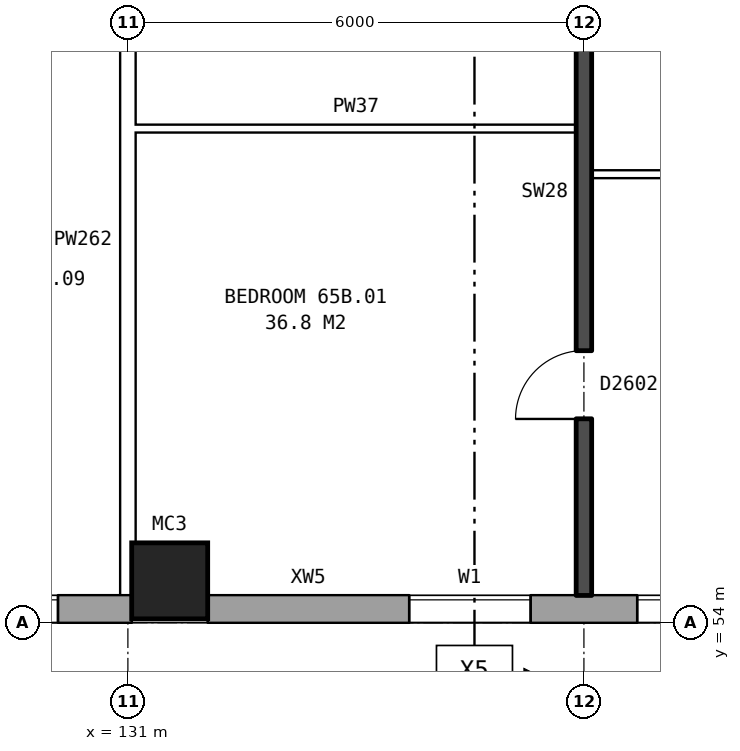
"""IFC4 building model, lengths in metres.
Left out: names, types, materials, properties, quantities, classifications, styles, units other than length and angle.
Written with IfcOpenShell. Run it as: python <this file> out.ifc"""

import sys

from ifc_helpers import new_model, si_unit, direction, frame, frame_2d, origin, origin_2d, place, context, subcontext, project, spatial, rectangle, hollow_rectangle, extrude, element, fill, save


model = new_model("IFC4")
c1 = context("Model", 3, precision=1e-05, world=origin(), true_north=direction((0.0, 1.0)))
c2 = subcontext(c1, "Body", "Model", "MODEL_VIEW")
j1 = project(units=[si_unit("LENGTHUNIT", "METRE"), si_unit("PLANEANGLEUNIT", "RADIAN")], contexts=[c1])
p1 = place(None, origin())
s1 = spatial("IfcSite", under=j1, at=p1, CompositionType="ELEMENT")
p2 = place(p1, origin())
s2 = spatial("IfcBuilding", under=s1, at=p2, CompositionType="ELEMENT")
p3 = place(p2, frame((0.0, 0.0, 230.7)))
s3 = spatial("IfcBuildingStorey", under=s2, at=p3, CompositionType="ELEMENT", Elevation=230.7)
p4 = place(p3, frame((131.55, 54.55, 0.0), z_axis=(0.0, 0.0, 1.0), x_axis=(1.0, 0.0, 0.0)))
e1 = element("IfcColumn", 1, at=p4, inside=s3, PredefinedType="COLUMN", context=c2, shape_type="SweptSolid", body=[
    extrude(hollow_rectangle(XDim=1.0, YDim=1.0, WallThickness=0.055, at=origin_2d()), origin(), (0.0, 0.0, 1.0), 3.1),
])
p5 = place(p3, frame((75.95, 54.18, 0.0), z_axis=(0.0, 0.0, 1.0), x_axis=(1.0, 0.0, 0.0)))
e2 = element("IfcWall", 2, at=p5, inside=s3, PredefinedType="STANDARD", context=c2, shape_type="SweptSolid", body=[
    extrude(rectangle(XDim=55.1, YDim=0.36, at=frame_2d((27.55, 0.0))), origin(), (0.0, 0.0, 1.0), 2.85),
])
p6 = place(p5, frame((0.969, 0.0, 0.8)))
e3 = element("IfcOpeningElement", 3, at=p6, cuts=e2, PredefinedType="OPENING", context=c2, shape_type="SweptSolid", body=[
    extrude(rectangle(XDim=1.6, YDim=1.8, at=frame_2d((0.8, 0.9))), frame((0.0, 0.19, 0.0), z_axis=(0.0, -1.0, 0.0), x_axis=(1.0, 0.0, 0.0)), (0.0, 0.0, 1.0), 0.38),
])
p7 = place(p5, frame((4.406, 0.0, 0.8)))
e4 = element("IfcOpeningElement", 4, at=p7, cuts=e2, PredefinedType="OPENING", context=c2, shape_type="SweptSolid", body=[
    extrude(rectangle(XDim=1.6, YDim=1.8, at=frame_2d((0.8, 0.9))), frame((0.0, 0.19, 0.0), z_axis=(0.0, -1.0, 0.0), x_axis=(1.0, 0.0, 0.0)), (0.0, 0.0, 1.0), 0.38),
])
p8 = place(p5, frame((7.844, 0.0, 0.8)))
e5 = element("IfcOpeningElement", 5, at=p8, cuts=e2, PredefinedType="OPENING", context=c2, shape_type="SweptSolid", body=[
    extrude(rectangle(XDim=1.6, YDim=1.8, at=frame_2d((0.8, 0.9))), frame((0.0, 0.19, 0.0), z_axis=(0.0, -1.0, 0.0), x_axis=(1.0, 0.0, 0.0)), (0.0, 0.0, 1.0), 0.38),
])
p9 = place(p5, frame((11.281, 0.0, 0.8)))
e6 = element("IfcOpeningElement", 6, at=p9, cuts=e2, PredefinedType="OPENING", context=c2, shape_type="SweptSolid", body=[
    extrude(rectangle(XDim=1.6, YDim=1.8, at=frame_2d((0.8, 0.9))), frame((0.0, 0.19, 0.0), z_axis=(0.0, -1.0, 0.0), x_axis=(1.0, 0.0, 0.0)), (0.0, 0.0, 1.0), 0.38),
])
p10 = place(p5, frame((14.719, 0.0, 0.8)))
e7 = element("IfcOpeningElement", 7, at=p10, cuts=e2, PredefinedType="OPENING", context=c2, shape_type="SweptSolid", body=[
    extrude(rectangle(XDim=1.6, YDim=1.8, at=frame_2d((0.8, 0.9))), frame((0.0, 0.19, 0.0), z_axis=(0.0, -1.0, 0.0), x_axis=(1.0, 0.0, 0.0)), (0.0, 0.0, 1.0), 0.38),
])
p11 = place(p5, frame((18.156, 0.0, 0.8)))
e8 = element("IfcOpeningElement", 8, at=p11, cuts=e2, PredefinedType="OPENING", context=c2, shape_type="SweptSolid", body=[
    extrude(rectangle(XDim=1.6, YDim=1.8, at=frame_2d((0.8, 0.9))), frame((0.0, 0.19, 0.0), z_axis=(0.0, -1.0, 0.0), x_axis=(1.0, 0.0, 0.0)), (0.0, 0.0, 1.0), 0.38),
])
p12 = place(p5, frame((21.594, 0.0, 0.8)))
e9 = element("IfcOpeningElement", 9, at=p12, cuts=e2, PredefinedType="OPENING", context=c2, shape_type="SweptSolid", body=[
    extrude(rectangle(XDim=1.6, YDim=1.8, at=frame_2d((0.8, 0.9))), frame((0.0, 0.19, 0.0), z_axis=(0.0, -1.0, 0.0), x_axis=(1.0, 0.0, 0.0)), (0.0, 0.0, 1.0), 0.38),
])
p13 = place(p5, frame((25.031, 0.0, 0.8)))
e10 = element("IfcOpeningElement", 10, at=p13, cuts=e2, PredefinedType="OPENING", context=c2, shape_type="SweptSolid", body=[
    extrude(rectangle(XDim=1.6, YDim=1.8, at=frame_2d((0.8, 0.9))), frame((0.0, 0.19, 0.0), z_axis=(0.0, -1.0, 0.0), x_axis=(1.0, 0.0, 0.0)), (0.0, 0.0, 1.0), 0.38),
])
p14 = place(p5, frame((28.469, 0.0, 0.8)))
e11 = element("IfcOpeningElement", 11, at=p14, cuts=e2, PredefinedType="OPENING", context=c2, shape_type="SweptSolid", body=[
    extrude(rectangle(XDim=1.6, YDim=1.8, at=frame_2d((0.8, 0.9))), frame((0.0, 0.19, 0.0), z_axis=(0.0, -1.0, 0.0), x_axis=(1.0, 0.0, 0.0)), (0.0, 0.0, 1.0), 0.38),
])
p15 = place(p5, frame((31.906, 0.0, 0.8)))
e12 = element("IfcOpeningElement", 12, at=p15, cuts=e2, PredefinedType="OPENING", context=c2, shape_type="SweptSolid", body=[
    extrude(rectangle(XDim=1.6, YDim=1.8, at=frame_2d((0.8, 0.9))), frame((0.0, 0.19, 0.0), z_axis=(0.0, -1.0, 0.0), x_axis=(1.0, 0.0, 0.0)), (0.0, 0.0, 1.0), 0.38),
])
p16 = place(p5, frame((35.344, 0.0, 0.8)))
e13 = element("IfcOpeningElement", 13, at=p16, cuts=e2, PredefinedType="OPENING", context=c2, shape_type="SweptSolid", body=[
    extrude(rectangle(XDim=1.6, YDim=1.8, at=frame_2d((0.8, 0.9))), frame((0.0, 0.19, 0.0), z_axis=(0.0, -1.0, 0.0), x_axis=(1.0, 0.0, 0.0)), (0.0, 0.0, 1.0), 0.38),
])
p17 = place(p5, frame((38.781, 0.0, 0.8)))
e14 = element("IfcOpeningElement", 14, at=p17, cuts=e2, PredefinedType="OPENING", context=c2, shape_type="SweptSolid", body=[
    extrude(rectangle(XDim=1.6, YDim=1.8, at=frame_2d((0.8, 0.9))), frame((0.0, 0.19, 0.0), z_axis=(0.0, -1.0, 0.0), x_axis=(1.0, 0.0, 0.0)), (0.0, 0.0, 1.0), 0.38),
])
p18 = place(p5, frame((42.219, 0.0, 0.8)))
e15 = element("IfcOpeningElement", 15, at=p18, cuts=e2, PredefinedType="OPENING", context=c2, shape_type="SweptSolid", body=[
    extrude(rectangle(XDim=1.6, YDim=1.8, at=frame_2d((0.8, 0.9))), frame((0.0, 0.19, 0.0), z_axis=(0.0, -1.0, 0.0), x_axis=(1.0, 0.0, 0.0)), (0.0, 0.0, 1.0), 0.38),
])
p19 = place(p5, frame((45.656, 0.0, 0.8)))
e16 = element("IfcOpeningElement", 16, at=p19, cuts=e2, PredefinedType="OPENING", context=c2, shape_type="SweptSolid", body=[
    extrude(rectangle(XDim=1.6, YDim=1.8, at=frame_2d((0.8, 0.9))), frame((0.0, 0.19, 0.0), z_axis=(0.0, -1.0, 0.0), x_axis=(1.0, 0.0, 0.0)), (0.0, 0.0, 1.0), 0.38),
])
p20 = place(p5, frame((49.094, 0.0, 0.8)))
e17 = element("IfcOpeningElement", 17, at=p20, cuts=e2, PredefinedType="OPENING", context=c2, shape_type="SweptSolid", body=[
    extrude(rectangle(XDim=1.6, YDim=1.8, at=frame_2d((0.8, 0.9))), frame((0.0, 0.19, 0.0), z_axis=(0.0, -1.0, 0.0), x_axis=(1.0, 0.0, 0.0)), (0.0, 0.0, 1.0), 0.38),
])
p21 = place(p5, frame((52.531, 0.0, 0.8)))
e18 = element("IfcOpeningElement", 18, at=p21, cuts=e2, PredefinedType="OPENING", context=c2, shape_type="SweptSolid", body=[
    extrude(rectangle(XDim=1.6, YDim=1.8, at=frame_2d((0.8, 0.9))), frame((0.0, 0.19, 0.0), z_axis=(0.0, -1.0, 0.0), x_axis=(1.0, 0.0, 0.0)), (0.0, 0.0, 1.0), 0.38),
])
p22 = place(p3, frame((132.05, 54.18, 0.0), z_axis=(0.0, 0.0, 1.0), x_axis=(1.0, 0.0, 0.0)))
e19 = element("IfcWall", 19, at=p22, inside=s3, PredefinedType="STANDARD", context=c2, shape_type="SweptSolid", body=[
    extrude(rectangle(XDim=33.875, YDim=0.36, at=frame_2d((16.938, 0.0))), origin(), (0.0, 0.0, 1.0), 2.85),
])
p23 = place(p22, frame((2.65, 0.0, 0.8)))
e20 = element("IfcOpeningElement", 20, at=p23, cuts=e19, PredefinedType="OPENING", context=c2, shape_type="SweptSolid", body=[
    extrude(rectangle(XDim=1.6, YDim=1.8, at=frame_2d((0.8, 0.9))), frame((0.0, 0.19, 0.0), z_axis=(0.0, -1.0, 0.0), x_axis=(1.0, 0.0, 0.0)), (0.0, 0.0, 1.0), 0.38),
])
p24 = place(p22, frame((5.65, 0.0, 0.8)))
e21 = element("IfcOpeningElement", 21, at=p24, cuts=e19, PredefinedType="OPENING", context=c2, shape_type="SweptSolid", body=[
    extrude(rectangle(XDim=1.6, YDim=1.8, at=frame_2d((0.8, 0.9))), frame((0.0, 0.19, 0.0), z_axis=(0.0, -1.0, 0.0), x_axis=(1.0, 0.0, 0.0)), (0.0, 0.0, 1.0), 0.38),
])
p25 = place(p22, frame((8.65, 0.0, 0.8)))
e22 = element("IfcOpeningElement", 22, at=p25, cuts=e19, PredefinedType="OPENING", context=c2, shape_type="SweptSolid", body=[
    extrude(rectangle(XDim=1.6, YDim=1.8, at=frame_2d((0.8, 0.9))), frame((0.0, 0.19, 0.0), z_axis=(0.0, -1.0, 0.0), x_axis=(1.0, 0.0, 0.0)), (0.0, 0.0, 1.0), 0.38),
])
p26 = place(p22, frame((11.65, 0.0, 0.8)))
e23 = element("IfcOpeningElement", 23, at=p26, cuts=e19, PredefinedType="OPENING", context=c2, shape_type="SweptSolid", body=[
    extrude(rectangle(XDim=1.6, YDim=1.8, at=frame_2d((0.8, 0.9))), frame((0.0, 0.19, 0.0), z_axis=(0.0, -1.0, 0.0), x_axis=(1.0, 0.0, 0.0)), (0.0, 0.0, 1.0), 0.38),
])
p27 = place(p22, frame((14.1, 0.0, 1.25)))
e24 = element("IfcOpeningElement", 24, at=p27, cuts=e19, PredefinedType="OPENING", context=c2, shape_type="SweptSolid", body=[
    extrude(rectangle(XDim=0.8, YDim=1.2, at=frame_2d((0.4, 0.6))), frame((0.0, 0.19, 0.0), z_axis=(0.0, -1.0, 0.0), x_axis=(1.0, 0.0, 0.0)), (0.0, 0.0, 1.0), 0.38),
])
p28 = place(p22, frame((17.65, 0.0, 0.8)))
e25 = element("IfcOpeningElement", 25, at=p28, cuts=e19, PredefinedType="OPENING", context=c2, shape_type="SweptSolid", body=[
    extrude(rectangle(XDim=1.6, YDim=1.8, at=frame_2d((0.8, 0.9))), frame((0.0, 0.19, 0.0), z_axis=(0.0, -1.0, 0.0), x_axis=(1.0, 0.0, 0.0)), (0.0, 0.0, 1.0), 0.38),
])
p29 = place(p22, frame((21.25, 0.0, 0.8)))
e26 = element("IfcOpeningElement", 26, at=p29, cuts=e19, PredefinedType="OPENING", context=c2, shape_type="SweptSolid", body=[
    extrude(rectangle(XDim=1.4, YDim=1.8, at=frame_2d((0.7, 0.9))), frame((0.0, 0.19, 0.0), z_axis=(0.0, -1.0, 0.0), x_axis=(1.0, 0.0, 0.0)), (0.0, 0.0, 1.0), 0.38),
])
p30 = place(p22, frame((23.65, 0.0, 0.8)))
e27 = element("IfcOpeningElement", 27, at=p30, cuts=e19, PredefinedType="OPENING", context=c2, shape_type="SweptSolid", body=[
    extrude(rectangle(XDim=1.6, YDim=1.8, at=frame_2d((0.8, 0.9))), frame((0.0, 0.19, 0.0), z_axis=(0.0, -1.0, 0.0), x_axis=(1.0, 0.0, 0.0)), (0.0, 0.0, 1.0), 0.38),
])
p31 = place(p22, frame((26.65, 0.0, 0.8)))
e28 = element("IfcOpeningElement", 28, at=p31, cuts=e19, PredefinedType="OPENING", context=c2, shape_type="SweptSolid", body=[
    extrude(rectangle(XDim=1.6, YDim=1.8, at=frame_2d((0.8, 0.9))), frame((0.0, 0.19, 0.0), z_axis=(0.0, -1.0, 0.0), x_axis=(1.0, 0.0, 0.0)), (0.0, 0.0, 1.0), 0.38),
])
p32 = place(p22, frame((29.65, 0.0, 0.8)))
e29 = element("IfcOpeningElement", 29, at=p32, cuts=e19, PredefinedType="OPENING", context=c2, shape_type="SweptSolid", body=[
    extrude(rectangle(XDim=1.6, YDim=1.8, at=frame_2d((0.8, 0.9))), frame((0.0, 0.19, 0.0), z_axis=(0.0, -1.0, 0.0), x_axis=(1.0, 0.0, 0.0)), (0.0, 0.0, 1.0), 0.38),
])
p33 = place(p22, frame((16.1, 0.0, 0.15)))
e30 = element("IfcOpeningElement", 30, at=p33, cuts=e19, PredefinedType="OPENING", context=c2, shape_type="SweptSolid", body=[
    extrude(rectangle(XDim=0.6, YDim=1.2, at=frame_2d((0.3, 0.6))), frame((0.0, 0.19, 0.0), z_axis=(0.0, -1.0, 0.0), x_axis=(1.0, 0.0, 0.0)), (0.0, 0.0, 1.0), 0.38),
])
p34 = place(p3, frame((137.1, 59.9, 0.0), z_axis=(0.0, 0.0, 1.0), x_axis=(1.0, 0.0, 0.0)))
e31 = element("IfcWall", 31, at=p34, inside=s3, PredefinedType="PARTITIONING", context=c2, shape_type="SweptSolid", body=[
    extrude(rectangle(XDim=5.8, YDim=0.1, at=frame_2d((2.9, 0.0))), origin(), (0.0, 0.0, 1.0), 2.85),
])
p35 = place(p34, frame((1.3, 0.0, 0.0)))
e32 = element("IfcOpeningElement", 32, at=p35, cuts=e31, PredefinedType="OPENING", context=c2, shape_type="SweptSolid", body=[
    extrude(rectangle(XDim=0.9, YDim=2.1, at=frame_2d((0.45, 1.05))), frame((0.0, 0.06, 0.0), z_axis=(0.0, -1.0, 0.0), x_axis=(1.0, 0.0, 0.0)), (0.0, 0.0, 1.0), 0.12),
])
p36 = place(p34, frame((4.2, 0.0, 0.0)))
e33 = element("IfcOpeningElement", 33, at=p36, cuts=e31, PredefinedType="OPENING", context=c2, shape_type="SweptSolid", body=[
    extrude(rectangle(XDim=0.9, YDim=2.1, at=frame_2d((0.45, 1.05))), frame((0.0, 0.06, 0.0), z_axis=(0.0, -1.0, 0.0), x_axis=(1.0, 0.0, 0.0)), (0.0, 0.0, 1.0), 0.12),
])
p37 = place(p3, frame((131.1, 60.5, 0.0), z_axis=(0.0, 0.0, 1.0), x_axis=(1.0, 0.0, 0.0)))
e34 = element("IfcWall", 34, at=p37, inside=s3, PredefinedType="PARTITIONING", context=c2, shape_type="SweptSolid", body=[
    extrude(rectangle(XDim=5.8, YDim=0.1, at=frame_2d((2.9, 0.0))), origin(), (0.0, 0.0, 1.0), 2.85),
])
p38 = place(p3, frame((131.0, 54.36, 0.0), z_axis=(0.0, 0.0, 1.0), x_axis=(0.0, 1.0, 0.0)))
e35 = element("IfcWall", 35, at=p38, inside=s3, PredefinedType="PARTITIONING", context=c2, shape_type="SweptSolid", body=[
    extrude(rectangle(XDim=9.34, YDim=0.2, at=frame_2d((4.67, 0.0))), origin(), (0.0, 0.0, 1.0), 2.85),
])
p39 = place(p3, frame((137.0, 54.36, 0.0), z_axis=(0.0, 0.0, 1.0), x_axis=(0.0, 1.0, 0.0)))
e36 = element("IfcWall", 36, at=p39, inside=s3, PredefinedType="SOLIDWALL", context=c2, shape_type="SweptSolid", body=[
    extrude(rectangle(XDim=9.44, YDim=0.2, at=frame_2d((4.72, 0.0))), origin(), (0.0, 0.0, 1.0), 2.85),
])
p40 = place(p39, frame((2.32, 0.0, 0.0)))
e37 = element("IfcOpeningElement", 37, at=p40, cuts=e36, PredefinedType="OPENING", context=c2, shape_type="SweptSolid", body=[
    extrude(rectangle(XDim=0.9, YDim=2.1, at=frame_2d((0.45, 1.05))), frame((0.0, 0.11, 0.0), z_axis=(0.0, -1.0, 0.0), x_axis=(1.0, 0.0, 0.0)), (0.0, 0.0, 1.0), 0.22),
])
p41 = place(p39, frame((7.39, 0.0, 0.0)))
e38 = element("IfcOpeningElement", 38, at=p41, cuts=e36, PredefinedType="OPENING", context=c2, shape_type="SweptSolid", body=[
    extrude(rectangle(XDim=0.8, YDim=2.1, at=frame_2d((0.4, 1.05))), frame((0.0, 0.11, 0.0), z_axis=(0.0, -1.0, 0.0), x_axis=(1.0, 0.0, 0.0)), (0.0, 0.0, 1.0), 0.22),
])
p42 = place(p21, origin())
e39 = element("IfcWindow", 39, at=p42, inside=s3, PartitioningType="SINGLE_PANEL", PredefinedType="WINDOW", context=c2, shape_type="SweptSolid", body=[
    extrude(rectangle(XDim=1.6, YDim=1.8, at=frame_2d((0.8, 0.9))), frame((0.0, 0.15, 0.0), z_axis=(0.0, -1.0, 0.0), x_axis=(1.0, 0.0, 0.0)), (0.0, 0.0, 1.0), 0.06),
])
fill(e18, e39)
p43 = place(p23, origin())
e40 = element("IfcWindow", 40, at=p43, inside=s3, PartitioningType="SINGLE_PANEL", PredefinedType="WINDOW", context=c2, shape_type="SweptSolid", body=[
    extrude(rectangle(XDim=1.6, YDim=1.8, at=frame_2d((0.8, 0.9))), frame((0.0, 0.15, 0.0), z_axis=(0.0, -1.0, 0.0), x_axis=(1.0, 0.0, 0.0)), (0.0, 0.0, 1.0), 0.06),
])
fill(e20, e40)
p44 = place(p24, origin())
e41 = element("IfcWindow", 41, at=p44, inside=s3, PartitioningType="SINGLE_PANEL", PredefinedType="WINDOW", context=c2, shape_type="SweptSolid", body=[
    extrude(rectangle(XDim=1.6, YDim=1.8, at=frame_2d((0.8, 0.9))), frame((0.0, 0.15, 0.0), z_axis=(0.0, -1.0, 0.0), x_axis=(1.0, 0.0, 0.0)), (0.0, 0.0, 1.0), 0.06),
])
fill(e21, e41)
p45 = place(p40, origin())
e42 = element("IfcDoor", 42, at=p45, inside=s3, OperationType="SINGLE_SWING_LEFT", PredefinedType="DOOR", context=c2, shape_type="SweptSolid", body=[
    extrude(rectangle(XDim=0.9, YDim=2.1, at=frame_2d((0.45, 1.05))), frame((0.0, 0.025, 0.0), z_axis=(0.0, -1.0, 0.0), x_axis=(1.0, 0.0, 0.0)), (0.0, 0.0, 1.0), 0.05),
])
fill(e37, e42)
save(model, sys.argv[1])
